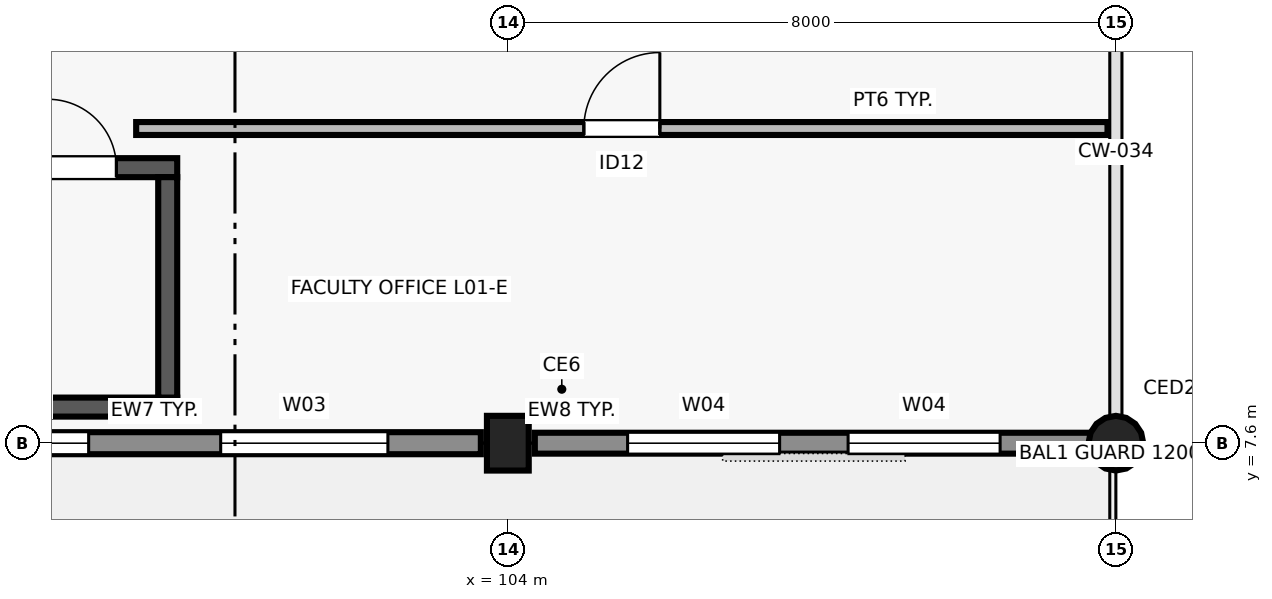
"""IFC4 building model, lengths in metres.
Left out: names, types, materials, properties, quantities, classifications, styles, units other than length and angle.
Written with IfcOpenShell. Run it as: python <this file> out.ifc"""

import sys

from ifc_helpers import new_model, si_unit, direction, frame, frame_2d, origin, origin_2d, place, context, subcontext, project, spatial, rectangle, circle, extrude, element, fill, save


model = new_model("IFC4")
c1 = context("Model", 3, precision=1e-05, world=origin(), true_north=direction((0.0, 1.0)))
c2 = subcontext(c1, "Body", "Model", "MODEL_VIEW")
j1 = project(units=[si_unit("LENGTHUNIT", "METRE"), si_unit("PLANEANGLEUNIT", "RADIAN")], contexts=[c1])
p1 = place(None, origin())
s1 = spatial("IfcSite", under=j1, at=p1, CompositionType="ELEMENT")
p2 = place(p1, origin())
s2 = spatial("IfcBuilding", under=s1, at=p2, CompositionType="ELEMENT")
p3 = place(p2, frame((0.0, 0.0, 4.5)))
s3 = spatial("IfcBuildingStorey", under=s2, at=p3, CompositionType="ELEMENT", Elevation=4.5)
p4 = place(p3, frame((104.0, 7.6, 0.0), z_axis=(0.0, 0.0, 1.0), x_axis=(1.0, 0.0, 0.0)))
e1 = element("IfcColumn", 1, at=p4, inside=s3, PredefinedType="COLUMN", context=c2, shape_type="SweptSolid", body=[
    extrude(rectangle(XDim=0.72, YDim=0.55, at=origin_2d()), origin(), (0.0, 0.0, 1.0), 4.5),
])
p5 = place(p3, frame((112.0, 7.6, 0.0), z_axis=(0.0, 0.0, 1.0), x_axis=(1.0, 0.0, 0.0)))
e2 = element("IfcColumn", 2, at=p5, inside=s3, PredefinedType="COLUMN", context=c2, shape_type="SweptSolid", body=[
    extrude(circle(Radius=0.36, at=origin_2d()), origin(), (0.0, 0.0, 1.0), 4.5),
])
p6 = place(p3, frame((96.37, 7.6, 0.0), z_axis=(0.0, 0.0, 1.0), x_axis=(1.0, 0.0, 0.0)))
e3 = element("IfcWall", 3, at=p6, inside=s3, PredefinedType="SOLIDWALL", context=c2, shape_type="SweptSolid", body=[
    extrude(rectangle(XDim=7.275, YDim=0.29, at=frame_2d((3.637, 0.0))), origin(), (0.0, 0.0, 1.0), 4.22),
])
p7 = place(p6, frame((0.515, 0.0, 0.9)))
e4 = element("IfcOpeningElement", 4, at=p7, cuts=e3, PredefinedType="OPENING", context=c2, shape_type="SweptSolid", body=[
    extrude(rectangle(XDim=1.6, YDim=1.8, at=frame_2d((0.8, 0.9))), frame((0.0, 0.155, 0.0), z_axis=(0.0, -1.0, 0.0), x_axis=(1.0, 0.0, 0.0)), (0.0, 0.0, 1.0), 0.31),
])
p8 = place(p6, frame((3.852, 0.0, 0.9)))
e5 = element("IfcOpeningElement", 5, at=p8, cuts=e3, PredefinedType="OPENING", context=c2, shape_type="SweptSolid", body=[
    extrude(rectangle(XDim=2.2, YDim=1.8, at=frame_2d((1.1, 0.9))), frame((0.0, 0.155, 0.0), z_axis=(0.0, -1.0, 0.0), x_axis=(1.0, 0.0, 0.0)), (0.0, 0.0, 1.0), 0.31),
])
p9 = place(p3, frame((104.355, 7.6, 0.0), z_axis=(0.0, 0.0, 1.0), x_axis=(1.0, 0.0, 0.0)))
e6 = element("IfcWall", 6, at=p9, inside=s3, PredefinedType="SOLIDWALL", context=c2, shape_type="SweptSolid", body=[
    extrude(rectangle(XDim=7.343, YDim=0.275, at=frame_2d((3.671, 0.0))), origin(), (0.0, 0.0, 1.0), 3.57),
])
p10 = place(p9, frame((1.221, 0.0, 0.9)))
e7 = element("IfcOpeningElement", 7, at=p10, cuts=e6, PredefinedType="OPENING", context=c2, shape_type="SweptSolid", body=[
    extrude(rectangle(XDim=2.0, YDim=1.8, at=frame_2d((1.0, 0.9))), frame((0.0, 0.147, 0.0), z_axis=(0.0, -1.0, 0.0), x_axis=(1.0, 0.0, 0.0)), (0.0, 0.0, 1.0), 0.295),
])
p11 = place(p9, frame((4.122, 0.0, 0.9)))
e8 = element("IfcOpeningElement", 8, at=p11, cuts=e6, PredefinedType="OPENING", context=c2, shape_type="SweptSolid", body=[
    extrude(rectangle(XDim=2.0, YDim=1.8, at=frame_2d((1.0, 0.9))), frame((0.0, 0.147, 0.0), z_axis=(0.0, -1.0, 0.0), x_axis=(1.0, 0.0, 0.0)), (0.0, 0.0, 1.0), 0.295),
])
p12 = place(p3, frame((97.15, 8.075, 0.0), z_axis=(0.0, 0.0, 1.0), x_axis=(1.0, 0.0, 0.0)))
e9 = element("IfcWall", 9, at=p12, inside=s3, PredefinedType="SHEAR", context=c2, shape_type="SweptSolid", body=[
    extrude(rectangle(XDim=2.5, YDim=0.25, at=frame_2d((1.25, 0.0))), origin(), (0.0, 0.0, 1.0), 4.22),
])
p13 = place(p3, frame((97.15, 11.225, 0.0), z_axis=(0.0, 0.0, 1.0), x_axis=(1.0, 0.0, 0.0)))
e10 = element("IfcWall", 10, at=p13, inside=s3, PredefinedType="SHEAR", context=c2, shape_type="SweptSolid", body=[
    extrude(rectangle(XDim=2.5, YDim=0.25, at=frame_2d((1.25, 0.0))), origin(), (0.0, 0.0, 1.0), 4.22),
])
p14 = place(p13, frame((0.8, 0.0, 0.0)))
e11 = element("IfcOpeningElement", 11, at=p14, cuts=e10, PredefinedType="OPENING", context=c2, shape_type="SweptSolid", body=[
    extrude(rectangle(XDim=0.9, YDim=2.05, at=frame_2d((0.45, 1.025))), frame((0.0, 0.135, 0.0), z_axis=(0.0, -1.0, 0.0), x_axis=(1.0, 0.0, 0.0)), (0.0, 0.0, 1.0), 0.27),
])
p15 = place(p3, frame((99.525, 8.2, 0.0), z_axis=(0.0, 0.0, 1.0), x_axis=(0.0, 1.0, 0.0)))
e12 = element("IfcWall", 12, at=p15, inside=s3, PredefinedType="SHEAR", context=c2, shape_type="SweptSolid", body=[
    extrude(rectangle(XDim=2.9, YDim=0.25, at=frame_2d((1.45, 0.0))), origin(), (0.0, 0.0, 1.0), 4.22),
])
p16 = place(p3, frame((99.11, 11.74, 0.0), z_axis=(0.0, 0.0, 1.0), x_axis=(1.0, 0.0, 0.0)))
e13 = element("IfcWall", 13, at=p16, inside=s3, PredefinedType="PARTITIONING", context=c2, shape_type="SweptSolid", body=[
    extrude(rectangle(XDim=12.78, YDim=0.17, at=frame_2d((6.39, 0.0))), origin(), (0.0, 0.0, 1.0), 4.2),
])
p17 = place(p16, frame((5.89, 0.0, 0.0)))
e14 = element("IfcOpeningElement", 14, at=p17, cuts=e13, PredefinedType="OPENING", context=c2, shape_type="SweptSolid", body=[
    extrude(rectangle(XDim=1.0, YDim=2.15, at=frame_2d((0.5, 1.075))), frame((0.0, 0.095, 0.0), z_axis=(0.0, -1.0, 0.0), x_axis=(1.0, 0.0, 0.0)), (0.0, 0.0, 1.0), 0.19),
])
p18 = place(p7, origin())
e15 = element("IfcWindow", 15, at=p18, inside=s3, PartitioningType="SINGLE_PANEL", PredefinedType="WINDOW", context=c2, shape_type="SweptSolid", body=[
    extrude(rectangle(XDim=1.6, YDim=1.8, at=frame_2d((0.8, 0.9))), frame((0.0, 0.03, 0.0), z_axis=(0.0, -1.0, 0.0), x_axis=(1.0, 0.0, 0.0)), (0.0, 0.0, 1.0), 0.06),
])
fill(e4, e15)
p19 = place(p8, origin())
e16 = element("IfcWindow", 16, at=p19, inside=s3, PartitioningType="SINGLE_PANEL", PredefinedType="WINDOW", context=c2, shape_type="SweptSolid", body=[
    extrude(rectangle(XDim=2.2, YDim=1.8, at=frame_2d((1.1, 0.9))), frame((0.0, 0.03, 0.0), z_axis=(0.0, -1.0, 0.0), x_axis=(1.0, 0.0, 0.0)), (0.0, 0.0, 1.0), 0.06),
])
fill(e5, e16)
p20 = place(p10, origin())
e17 = element("IfcWindow", 17, at=p20, inside=s3, PartitioningType="SINGLE_PANEL", PredefinedType="WINDOW", context=c2, shape_type="SweptSolid", body=[
    extrude(rectangle(XDim=2.0, YDim=1.8, at=frame_2d((1.0, 0.9))), frame((0.0, 0.03, 0.0), z_axis=(0.0, -1.0, 0.0), x_axis=(1.0, 0.0, 0.0)), (0.0, 0.0, 1.0), 0.06),
])
fill(e7, e17)
p21 = place(p11, origin())
e18 = element("IfcWindow", 18, at=p21, inside=s3, PartitioningType="SINGLE_PANEL", PredefinedType="WINDOW", context=c2, shape_type="SweptSolid", body=[
    extrude(rectangle(XDim=2.0, YDim=1.8, at=frame_2d((1.0, 0.9))), frame((0.0, 0.03, 0.0), z_axis=(0.0, -1.0, 0.0), x_axis=(1.0, 0.0, 0.0)), (0.0, 0.0, 1.0), 0.06),
])
fill(e8, e18)
p22 = place(p14, origin())
e19 = element("IfcDoor", 19, at=p22, inside=s3, OperationType="SINGLE_SWING_LEFT", PredefinedType="DOOR", context=c2, shape_type="SweptSolid", body=[
    extrude(rectangle(XDim=0.9, YDim=2.05, at=frame_2d((0.45, 1.025))), frame((0.0, 0.025, 0.0), z_axis=(0.0, -1.0, 0.0), x_axis=(1.0, 0.0, 0.0)), (0.0, 0.0, 1.0), 0.05),
])
fill(e11, e19)
p23 = place(p17, origin())
e20 = element("IfcDoor", 20, at=p23, inside=s3, OperationType="SINGLE_SWING_RIGHT", PredefinedType="DOOR", context=c2, shape_type="SweptSolid", body=[
    extrude(rectangle(XDim=1.0, YDim=2.15, at=frame_2d((0.5, 1.075))), frame((0.0, 0.025, 0.0), z_axis=(0.0, -1.0, 0.0), x_axis=(1.0, 0.0, 0.0)), (0.0, 0.0, 1.0), 0.05),
])
fill(e14, e20)
save(model, sys.argv[1])
